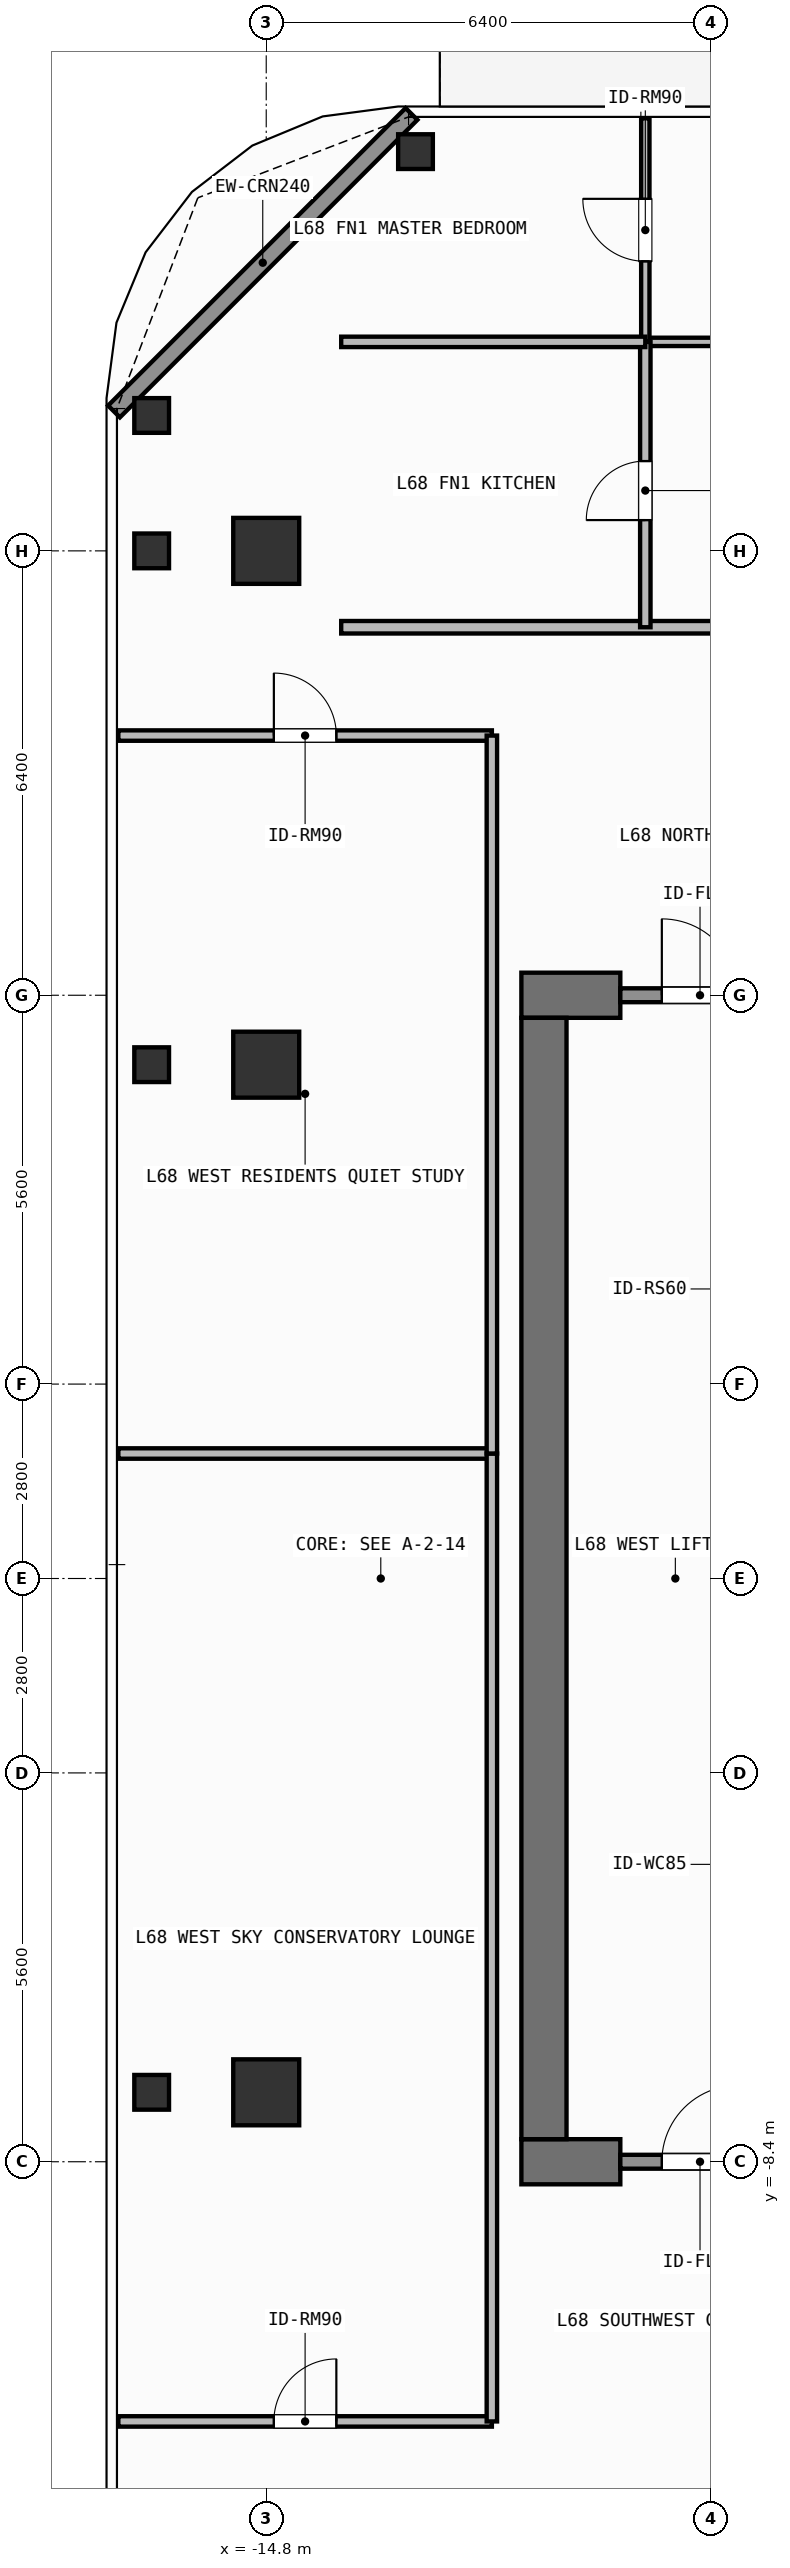
"""IFC4 building model, lengths in metres.
Left out: names, types, materials, properties, quantities, classifications, styles, units other than length and angle.
Written with IfcOpenShell. Run it as: python <this file> out.ifc"""

import sys

from ifc_helpers import new_model, si_unit, direction, frame, frame_2d, origin, origin_2d, place, context, subcontext, project, spatial, rectangle, hollow_rectangle, extrude, element, fill, save


model = new_model("IFC4")
c1 = context("Model", 3, precision=1e-05, world=origin(), true_north=direction((0.0, 1.0)))
c2 = subcontext(c1, "Body", "Model", "MODEL_VIEW")
j1 = project(units=[si_unit("LENGTHUNIT", "METRE"), si_unit("PLANEANGLEUNIT", "RADIAN")], contexts=[c1])
p1 = place(None, origin())
s1 = spatial("IfcSite", under=j1, at=p1, CompositionType="ELEMENT")
p2 = place(p1, origin())
s2 = spatial("IfcBuilding", under=s1, at=p2, CompositionType="ELEMENT")
p3 = place(p2, frame((0.0, 0.0, 278.1)))
s3 = spatial("IfcBuildingStorey", under=s2, at=p3, CompositionType="ELEMENT", Elevation=278.1)
for number, where, z_axis, x_axis in (
    (1, (-11.125, -8.4, 0.0), (0.0, 0.0, 1.0), (1.0, 0.0, 0.0)),
    (2, (-11.125, 8.4, 0.0), (0.0, 0.0, 1.0), (1.0, 0.0, 0.0)),
):
    element("IfcWall", number, at=place(p3, frame(where, z_axis=z_axis, x_axis=x_axis)), inside=s3, PredefinedType="SHEAR", context=c2, shape_type="SweptSolid", body=[
        extrude(rectangle(XDim=1.425, YDim=0.65, at=frame_2d((0.712, 0.0))), origin(), (0.0, 0.0, 1.0), 3.9),
    ])
p4 = place(p3, frame((-10.8, -8.075, 0.0), z_axis=(0.0, 0.0, 1.0), x_axis=(0.0, 1.0, 0.0)))
e3 = element("IfcWall", 3, at=p4, inside=s3, PredefinedType="SHEAR", context=c2, shape_type="SweptSolid", body=[
    extrude(rectangle(XDim=16.15, YDim=0.65, at=frame_2d((8.075, 0.0))), origin(), (0.0, 0.0, 1.0), 3.9),
])
for number, where, z_axis, x_axis in (
    (4, (-14.8, 14.8, 0.0), (0.0, 0.0, 1.0), (1.0, 0.0, 0.0)),
    (5, (-14.8, -7.4, 0.0), (0.0, 0.0, 1.0), (1.0, 0.0, 0.0)),
    (6, (-14.8, 7.4, 0.0), (0.0, 0.0, 1.0), (1.0, 0.0, 0.0)),
):
    element("IfcColumn", number, at=place(p3, frame(where, z_axis=z_axis, x_axis=x_axis)), inside=s3, PredefinedType="COLUMN", context=c2, shape_type="SweptSolid", body=[
        extrude(rectangle(XDim=0.95, YDim=0.95, at=origin_2d()), origin(), (0.0, 0.0, 1.0), 3.9),
    ])
for number, where, z_axis, x_axis in (
    (7, (-12.65, 20.55, 0.0), (0.0, 0.0, 1.0), (1.0, 0.0, 0.0)),
    (8, (-16.45, 16.75, 0.0), (0.0, 0.0, 1.0), (1.0, 0.0, 0.0)),
    (9, (-16.45, -7.4, 0.0), (0.0, 0.0, 1.0), (1.0, 0.0, 0.0)),
    (10, (-16.45, 7.4, 0.0), (0.0, 0.0, 1.0), (1.0, 0.0, 0.0)),
    (11, (-16.45, 14.8, 0.0), (0.0, 0.0, 1.0), (1.0, 0.0, 0.0)),
):
    element("IfcColumn", number, at=place(p3, frame(where, z_axis=z_axis, x_axis=x_axis)), inside=s3, PredefinedType="COLUMN", context=c2, shape_type="SweptSolid", body=[
        extrude(hollow_rectangle(XDim=0.5, YDim=0.5, WallThickness=0.025, at=origin_2d()), origin(), (0.0, 0.0, 1.0), 3.9),
    ])
p5 = place(p3, frame((-16.992, 16.808, 0.0), z_axis=(0.0, 0.0, 1.0), x_axis=(0.707126925818, 0.707086635981, 0.0)))
e12 = element("IfcWall", 12, at=p5, inside=s3, PredefinedType="SOLIDWALL", context=c2, shape_type="SweptSolid", body=[
    extrude(rectangle(XDim=6.06, YDim=0.24, at=frame_2d((3.03, 0.0))), origin(), (0.0, 0.0, 1.0), 3.68),
])
p6 = place(p3, frame((-9.7, -8.4, 0.0), z_axis=(0.0, 0.0, 1.0), x_axis=(1.0, 0.0, 0.0)))
e13 = element("IfcWall", 13, at=p6, inside=s3, PredefinedType="SOLIDWALL", context=c2, shape_type="SweptSolid", body=[
    extrude(rectangle(XDim=2.15, YDim=0.2, at=frame_2d((1.075, 0.0))), origin(), (0.0, 0.0, 1.0), 2.92),
])
p7 = place(p6, frame((0.598, 0.0, 0.0)))
e14 = element("IfcOpeningElement", 14, at=p7, cuts=e13, PredefinedType="OPENING", context=c2, shape_type="SweptSolid", body=[
    extrude(rectangle(XDim=1.1, YDim=2.15, at=frame_2d((0.55, 1.075))), frame((0.0, 0.11, 0.0), z_axis=(0.0, -1.0, 0.0), x_axis=(1.0, 0.0, 0.0)), (0.0, 0.0, 1.0), 0.22),
])
p8 = place(p3, frame((-9.7, 8.4, 0.0), z_axis=(0.0, 0.0, 1.0), x_axis=(1.0, 0.0, 0.0)))
e15 = element("IfcWall", 15, at=p8, inside=s3, PredefinedType="SOLIDWALL", context=c2, shape_type="SweptSolid", body=[
    extrude(rectangle(XDim=2.15, YDim=0.2, at=frame_2d((1.075, 0.0))), origin(), (0.0, 0.0, 1.0), 2.92),
])
p9 = place(p8, frame((0.598, 0.0, 0.0)))
e16 = element("IfcOpeningElement", 16, at=p9, cuts=e15, PredefinedType="OPENING", context=c2, shape_type="SweptSolid", body=[
    extrude(rectangle(XDim=1.1, YDim=2.15, at=frame_2d((0.55, 1.075))), frame((0.0, 0.11, 0.0), z_axis=(0.0, -1.0, 0.0), x_axis=(1.0, 0.0, 0.0)), (0.0, 0.0, 1.0), 0.22),
])
p10 = place(p3, frame((-13.72, 13.7, 0.0), z_axis=(0.0, 0.0, 1.0), x_axis=(1.0, 0.0, 0.0)))
e17 = element("IfcWall", 17, at=p10, inside=s3, PredefinedType="PARTITIONING", context=c2, shape_type="SweptSolid", body=[
    extrude(rectangle(XDim=19.734, YDim=0.18, at=frame_2d((9.867, 0.0))), origin(), (0.0, 0.0, 1.0), 3.68),
])
p11 = place(p10, frame((9.456, 0.0, 0.0)))
e18 = element("IfcOpeningElement", 18, at=p11, cuts=e17, PredefinedType="OPENING", context=c2, shape_type="SweptSolid", body=[
    extrude(rectangle(XDim=1.0, YDim=2.2, at=frame_2d((0.5, 1.1))), frame((0.0, 0.1, 0.0), z_axis=(0.0, -1.0, 0.0), x_axis=(1.0, 0.0, 0.0)), (0.0, 0.0, 1.0), 0.2),
])
p12 = place(p3, frame((-9.34, 17.81, 0.0), z_axis=(0.0, 0.0, 1.0), x_axis=(1.0, 0.0, 0.0)))
e19 = element("IfcWall", 19, at=p12, inside=s3, PredefinedType="PARTITIONING", context=c2, shape_type="SweptSolid", body=[
    extrude(rectangle(XDim=11.293, YDim=0.12, at=frame_2d((5.646, 0.0))), origin(), (0.0, 0.0, 1.0), 3.68),
])
p13 = place(p12, frame((5.197, 0.0, 0.0)))
e20 = element("IfcOpeningElement", 20, at=p13, cuts=e19, PredefinedType="OPENING", context=c2, shape_type="SweptSolid", body=[
    extrude(rectangle(XDim=0.9, YDim=2.1, at=frame_2d((0.45, 1.05))), frame((0.0, 0.07, 0.0), z_axis=(0.0, -1.0, 0.0), x_axis=(1.0, 0.0, 0.0)), (0.0, 0.0, 1.0), 0.14),
])
p14 = place(p3, frame((-9.34, 13.7, 0.0), z_axis=(0.0, 0.0, 1.0), x_axis=(0.0, 1.0, 0.0)))
e21 = element("IfcWall", 21, at=p14, inside=s3, PredefinedType="PARTITIONING", context=c2, shape_type="SweptSolid", body=[
    extrude(rectangle(XDim=4.11, YDim=0.15, at=frame_2d((2.055, 0.0))), origin(), (0.0, 0.0, 1.0), 3.68),
])
p15 = place(p14, frame((1.543, 0.0, 0.0)))
e22 = element("IfcOpeningElement", 22, at=p15, cuts=e21, PredefinedType="OPENING", context=c2, shape_type="SweptSolid", body=[
    extrude(rectangle(XDim=0.85, YDim=2.1, at=frame_2d((0.425, 1.05))), frame((0.0, 0.085, 0.0), z_axis=(0.0, -1.0, 0.0), x_axis=(1.0, 0.0, 0.0)), (0.0, 0.0, 1.0), 0.17),
])
p16 = place(p3, frame((-9.34, 17.81, 0.0), z_axis=(0.0, 0.0, 1.0), x_axis=(0.0, 1.0, 0.0)))
e23 = element("IfcWall", 23, at=p16, inside=s3, PredefinedType="PARTITIONING", context=c2, shape_type="SweptSolid", body=[
    extrude(rectangle(XDim=3.22, YDim=0.12, at=frame_2d((1.61, 0.0))), origin(), (0.0, 0.0, 1.0), 3.68),
])
p17 = place(p16, frame((1.16, 0.0, 0.0)))
e24 = element("IfcOpeningElement", 24, at=p17, cuts=e23, PredefinedType="OPENING", context=c2, shape_type="SweptSolid", body=[
    extrude(rectangle(XDim=0.9, YDim=2.1, at=frame_2d((0.45, 1.05))), frame((0.0, 0.07, 0.0), z_axis=(0.0, -1.0, 0.0), x_axis=(1.0, 0.0, 0.0)), (0.0, 0.0, 1.0), 0.14),
])
p18 = place(p3, frame((-16.93, -12.14, 0.0), z_axis=(0.0, 0.0, 1.0), x_axis=(1.0, 0.0, 0.0)))
e25 = element("IfcWall", 25, at=p18, inside=s3, PredefinedType="PARTITIONING", context=c2, shape_type="SweptSolid", body=[
    extrude(rectangle(XDim=5.38, YDim=0.15, at=frame_2d((2.69, 0.0))), origin(), (0.0, 0.0, 1.0), 3.68),
])
p19 = place(p18, frame((2.24, 0.0, 0.0)))
e26 = element("IfcOpeningElement", 26, at=p19, cuts=e25, PredefinedType="OPENING", context=c2, shape_type="SweptSolid", body=[
    extrude(rectangle(XDim=0.9, YDim=2.1, at=frame_2d((0.45, 1.05))), frame((0.0, 0.085, 0.0), z_axis=(0.0, -1.0, 0.0), x_axis=(1.0, 0.0, 0.0)), (0.0, 0.0, 1.0), 0.17),
])
p20 = place(p3, frame((-16.93, 12.14, 0.0), z_axis=(0.0, 0.0, 1.0), x_axis=(1.0, 0.0, 0.0)))
e27 = element("IfcWall", 27, at=p20, inside=s3, PredefinedType="PARTITIONING", context=c2, shape_type="SweptSolid", body=[
    extrude(rectangle(XDim=5.38, YDim=0.15, at=frame_2d((2.69, 0.0))), origin(), (0.0, 0.0, 1.0), 3.68),
])
p21 = place(p20, frame((2.24, 0.0, 0.0)))
e28 = element("IfcOpeningElement", 28, at=p21, cuts=e27, PredefinedType="OPENING", context=c2, shape_type="SweptSolid", body=[
    extrude(rectangle(XDim=0.9, YDim=2.1, at=frame_2d((0.45, 1.05))), frame((0.0, 0.085, 0.0), z_axis=(0.0, -1.0, 0.0), x_axis=(1.0, 0.0, 0.0)), (0.0, 0.0, 1.0), 0.17),
])
p22 = place(p3, frame((-13.72, 17.81, 0.0), z_axis=(0.0, 0.0, 1.0), x_axis=(1.0, 0.0, 0.0)))
e29 = element("IfcWall", 29, at=p22, inside=s3, PredefinedType="PARTITIONING", context=c2, shape_type="SweptSolid", body=[
    extrude(rectangle(XDim=4.38, YDim=0.15, at=frame_2d((2.19, 0.0))), origin(), (0.0, 0.0, 1.0), 3.68),
])
p23 = place(p3, frame((-16.93, 1.8, 0.0), z_axis=(0.0, 0.0, 1.0), x_axis=(1.0, 0.0, 0.0)))
e30 = element("IfcWall", 30, at=p23, inside=s3, PredefinedType="PARTITIONING", context=c2, shape_type="SweptSolid", body=[
    extrude(rectangle(XDim=5.38, YDim=0.15, at=frame_2d((2.69, 0.0))), origin(), (0.0, 0.0, 1.0), 3.68),
])
p24 = place(p3, frame((-11.55, -12.14, 0.0), z_axis=(0.0, 0.0, 1.0), x_axis=(0.0, 1.0, 0.0)))
e31 = element("IfcWall", 31, at=p24, inside=s3, PredefinedType="PARTITIONING", context=c2, shape_type="SweptSolid", body=[
    extrude(rectangle(XDim=13.94, YDim=0.15, at=frame_2d((6.97, 0.0))), origin(), (0.0, 0.0, 1.0), 3.68),
])
p25 = place(p3, frame((-11.55, 1.8, 0.0), z_axis=(0.0, 0.0, 1.0), x_axis=(0.0, 1.0, 0.0)))
e32 = element("IfcWall", 32, at=p25, inside=s3, PredefinedType="PARTITIONING", context=c2, shape_type="SweptSolid", body=[
    extrude(rectangle(XDim=10.34, YDim=0.15, at=frame_2d((5.17, 0.0))), origin(), (0.0, 0.0, 1.0), 3.68),
])
p26 = place(p7, origin())
e33 = element("IfcDoor", 33, at=p26, inside=s3, OperationType="SINGLE_SWING_RIGHT", PredefinedType="DOOR", context=c2, shape_type="SweptSolid", body=[
    extrude(rectangle(XDim=1.1, YDim=2.15, at=frame_2d((0.55, 1.075))), frame((0.0, 0.025, 0.0), z_axis=(0.0, -1.0, 0.0), x_axis=(1.0, 0.0, 0.0)), (0.0, 0.0, 1.0), 0.05),
])
fill(e14, e33)
p27 = place(p9, origin())
e34 = element("IfcDoor", 34, at=p27, inside=s3, OperationType="SINGLE_SWING_LEFT", PredefinedType="DOOR", context=c2, shape_type="SweptSolid", body=[
    extrude(rectangle(XDim=1.1, YDim=2.15, at=frame_2d((0.55, 1.075))), frame((0.0, 0.025, 0.0), z_axis=(0.0, -1.0, 0.0), x_axis=(1.0, 0.0, 0.0)), (0.0, 0.0, 1.0), 0.05),
])
fill(e16, e34)
p28 = place(p15, origin())
e35 = element("IfcDoor", 35, at=p28, inside=s3, OperationType="SINGLE_SWING_LEFT", PredefinedType="DOOR", context=c2, shape_type="SweptSolid", body=[
    extrude(rectangle(XDim=0.85, YDim=2.1, at=frame_2d((0.425, 1.05))), frame((0.0, 0.025, 0.0), z_axis=(0.0, -1.0, 0.0), x_axis=(1.0, 0.0, 0.0)), (0.0, 0.0, 1.0), 0.05),
])
fill(e22, e35)
p29 = place(p17, origin())
e36 = element("IfcDoor", 36, at=p29, inside=s3, OperationType="SINGLE_SWING_RIGHT", PredefinedType="DOOR", context=c2, shape_type="SweptSolid", body=[
    extrude(rectangle(XDim=0.9, YDim=2.1, at=frame_2d((0.45, 1.05))), frame((0.0, 0.025, 0.0), z_axis=(0.0, -1.0, 0.0), x_axis=(1.0, 0.0, 0.0)), (0.0, 0.0, 1.0), 0.05),
])
fill(e24, e36)
p30 = place(p19, origin())
e37 = element("IfcDoor", 37, at=p30, inside=s3, OperationType="SINGLE_SWING_RIGHT", PredefinedType="DOOR", context=c2, shape_type="SweptSolid", body=[
    extrude(rectangle(XDim=0.9, YDim=2.1, at=frame_2d((0.45, 1.05))), frame((0.0, 0.025, 0.0), z_axis=(0.0, -1.0, 0.0), x_axis=(1.0, 0.0, 0.0)), (0.0, 0.0, 1.0), 0.05),
])
fill(e26, e37)
p31 = place(p21, origin())
e38 = element("IfcDoor", 38, at=p31, inside=s3, OperationType="SINGLE_SWING_LEFT", PredefinedType="DOOR", context=c2, shape_type="SweptSolid", body=[
    extrude(rectangle(XDim=0.9, YDim=2.1, at=frame_2d((0.45, 1.05))), frame((0.0, 0.025, 0.0), z_axis=(0.0, -1.0, 0.0), x_axis=(1.0, 0.0, 0.0)), (0.0, 0.0, 1.0), 0.05),
])
fill(e28, e38)
save(model, sys.argv[1])
